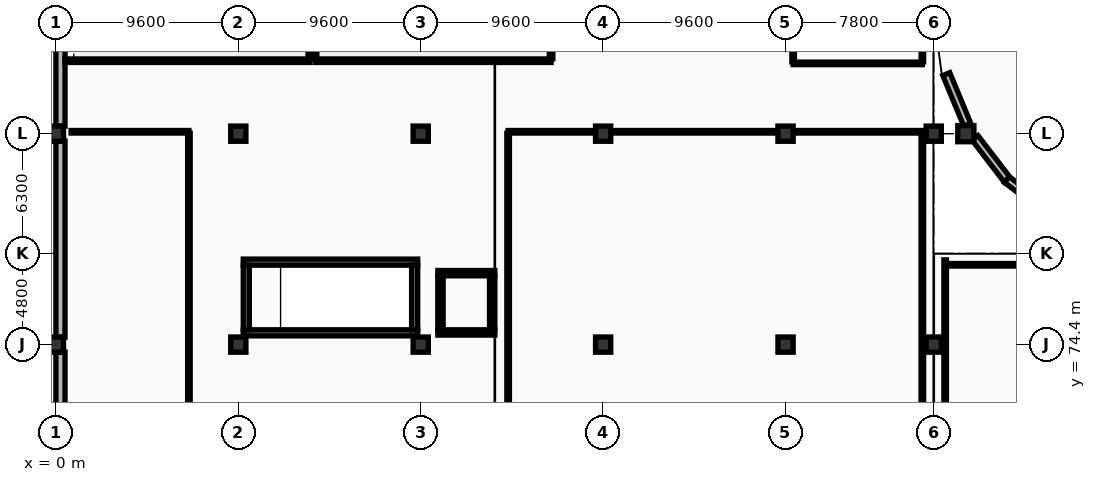
"""IFC4 building model, lengths in metres.
Left out: names, types, materials, properties, quantities, classifications, styles, units other than length and angle.
Written with IfcOpenShell. Run it as: python <this file> out.ifc"""

import sys

from ifc_helpers import new_model, si_unit, direction, frame, frame_2d, origin, origin_2d, place, context, subcontext, project, spatial, rectangle, circle, extrude, element, fill, save


model = new_model("IFC4")
c1 = context("Model", 3, precision=1e-05, world=origin(), true_north=direction((0.0, 1.0)))
c2 = subcontext(c1, "Body", "Model", "MODEL_VIEW")
j1 = project(units=[si_unit("LENGTHUNIT", "METRE"), si_unit("PLANEANGLEUNIT", "RADIAN")], contexts=[c1])
p1 = place(None, origin())
s1 = spatial("IfcSite", under=j1, at=p1, CompositionType="ELEMENT")
p2 = place(p1, origin())
s2 = spatial("IfcBuilding", under=s1, at=p2, CompositionType="ELEMENT")
p3 = place(p2, origin())
s3 = spatial("IfcBuildingStorey", under=s2, at=p3, CompositionType="ELEMENT", Elevation=0.0)
p4 = place(p3, frame((47.888, 85.5, 0.0), z_axis=(0.0, 0.0, 1.0), x_axis=(1.0, 0.0, 0.0)))
e1 = element("IfcColumn", 1, at=p4, inside=s3, PredefinedType="COLUMN", context=c2, shape_type="SweptSolid", body=[
    extrude(circle(Radius=0.425, at=origin_2d()), origin(), (0.0, 0.0, 1.0), 5.4),
])
for number, where, z_axis, x_axis in (
    (2, (0.0, 74.4, 0.0), (0.0, 0.0, 1.0), (1.0, 0.0, 0.0)),
    (3, (0.0, 85.5, 0.0), (0.0, 0.0, 1.0), (1.0, 0.0, 0.0)),
    (4, (9.6, 74.4, 0.0), (0.0, 0.0, 1.0), (1.0, 0.0, 0.0)),
    (5, (9.6, 85.5, 0.0), (0.0, 0.0, 1.0), (1.0, 0.0, 0.0)),
    (6, (19.2, 74.4, 0.0), (0.0, 0.0, 1.0), (1.0, 0.0, 0.0)),
    (7, (19.2, 85.5, 0.0), (0.0, 0.0, 1.0), (1.0, 0.0, 0.0)),
    (8, (28.8, 74.4, 0.0), (0.0, 0.0, 1.0), (1.0, 0.0, 0.0)),
    (9, (28.8, 85.5, 0.0), (0.0, 0.0, 1.0), (1.0, 0.0, 0.0)),
    (10, (38.4, 74.4, 0.0), (0.0, 0.0, 1.0), (1.0, 0.0, 0.0)),
    (11, (38.4, 85.5, 0.0), (0.0, 0.0, 1.0), (1.0, 0.0, 0.0)),
    (12, (46.2, 74.4, 0.0), (0.0, 0.0, 1.0), (1.0, 0.0, 0.0)),
    (13, (46.2, 85.5, 0.0), (0.0, 0.0, 1.0), (1.0, 0.0, 0.0)),
):
    element("IfcColumn", number, at=place(p3, frame(where, z_axis=z_axis, x_axis=x_axis)), inside=s3, PredefinedType="COLUMN", context=c2, shape_type="SweptSolid", body=[
        extrude(rectangle(XDim=0.8, YDim=0.8, at=origin_2d()), origin(), (0.0, 0.0, 1.0), 5.4),
    ])
p5 = place(p3, frame((46.86, 88.635, 0.0), z_axis=(0.0, 0.0, 1.0), x_axis=(0.382642547526, -0.923896466506, 0.0)))
e14 = element("IfcWall", 14, at=p5, inside=s3, PredefinedType="ELEMENTEDWALL", context=c2, shape_type="SweptSolid", body=[
    extrude(rectangle(XDim=2.892, YDim=0.395, at=frame_2d((1.446, 0.0))), origin(), (0.0, 0.0, 1.0), 4.27),
])
p6 = place(p5, frame((0.962, 0.0, 0.85)))
e15 = element("IfcOpeningElement", 15, at=p6, cuts=e14, PredefinedType="OPENING", context=c2, shape_type="SweptSolid", body=[
    extrude(rectangle(XDim=0.9, YDim=1.85, at=frame_2d((0.45, 0.925))), frame((0.0, 0.208, 0.0), z_axis=(0.0, -1.0, 0.0), x_axis=(1.0, 0.0, 0.0)), (0.0, 0.0, 1.0), 0.415),
])
p7 = place(p3, frame((48.369, 85.283, 0.0), z_axis=(0.0, 0.0, 1.0), x_axis=(0.608787157184, -0.793333597705, 0.0)))
e16 = element("IfcWall", 16, at=p7, inside=s3, PredefinedType="ELEMENTEDWALL", context=c2, shape_type="SweptSolid", body=[
    extrude(rectangle(XDim=2.824, YDim=0.395, at=frame_2d((1.412, 0.0))), origin(), (0.0, 0.0, 1.0), 4.27),
])
p8 = place(p7, frame((0.962, 0.0, 0.85)))
e17 = element("IfcOpeningElement", 17, at=p8, cuts=e16, PredefinedType="OPENING", context=c2, shape_type="SweptSolid", body=[
    extrude(rectangle(XDim=0.9, YDim=1.85, at=frame_2d((0.45, 0.925))), frame((0.0, 0.208, 0.0), z_axis=(0.0, -1.0, 0.0), x_axis=(1.0, 0.0, 0.0)), (0.0, 0.0, 1.0), 0.415),
])
p9 = place(p3, frame((50.043, 83.089, 0.0), z_axis=(0.0, 0.0, 1.0), x_axis=(0.793301558375, -0.608828906574, 0.0)))
e18 = element("IfcWall", 18, at=p9, inside=s3, PredefinedType="ELEMENTEDWALL", context=c2, shape_type="SweptSolid", body=[
    extrude(rectangle(XDim=2.824, YDim=0.395, at=frame_2d((1.412, 0.0))), origin(), (0.0, 0.0, 1.0), 4.17),
])
p10 = place(p9, frame((0.962, 0.0, 0.85)))
e19 = element("IfcOpeningElement", 19, at=p10, cuts=e18, PredefinedType="OPENING", context=c2, shape_type="SweptSolid", body=[
    extrude(rectangle(XDim=0.9, YDim=1.85, at=frame_2d((0.45, 0.925))), frame((0.0, 0.208, 0.0), z_axis=(0.0, -1.0, 0.0), x_axis=(1.0, 0.0, 0.0)), (0.0, 0.0, 1.0), 0.415),
])
p11 = place(p3, frame((0.24, 67.592, 0.0), z_axis=(0.0, 0.0, 1.0), x_axis=(0.0, 1.0, 0.0)))
e20 = element("IfcWall", 20, at=p11, inside=s3, PredefinedType="STANDARD", context=c2, shape_type="SweptSolid", body=[
    extrude(rectangle(XDim=6.416, YDim=0.48, at=frame_2d((3.208, 0.0))), origin(), (0.0, 0.0, 1.0), 4.28),
])
p12 = place(p11, frame((1.253, 0.0, 0.85)))
e21 = element("IfcOpeningElement", 21, at=p12, cuts=e20, PredefinedType="OPENING", context=c2, shape_type="SweptSolid", body=[
    extrude(rectangle(XDim=1.7, YDim=2.3, at=frame_2d((0.85, 1.15))), frame((0.0, 0.25, 0.0), z_axis=(0.0, -1.0, 0.0), x_axis=(1.0, 0.0, 0.0)), (0.0, 0.0, 1.0), 0.5),
])
p13 = place(p11, frame((3.703, 0.0, 0.85)))
e22 = element("IfcOpeningElement", 22, at=p13, cuts=e20, PredefinedType="OPENING", context=c2, shape_type="SweptSolid", body=[
    extrude(rectangle(XDim=1.7, YDim=2.3, at=frame_2d((0.85, 1.15))), frame((0.0, 0.25, 0.0), z_axis=(0.0, -1.0, 0.0), x_axis=(1.0, 0.0, 0.0)), (0.0, 0.0, 1.0), 0.5),
])
p14 = place(p3, frame((0.24, 74.792, 0.0), z_axis=(0.0, 0.0, 1.0), x_axis=(0.0, 1.0, 0.0)))
e23 = element("IfcWall", 23, at=p14, inside=s3, PredefinedType="STANDARD", context=c2, shape_type="SweptSolid", body=[
    extrude(rectangle(XDim=10.316, YDim=0.48, at=frame_2d((5.158, 0.0))), origin(), (0.0, 0.0, 1.0), 4.23),
])
p15 = place(p14, frame((1.295, 0.0, 0.85)))
e24 = element("IfcOpeningElement", 24, at=p15, cuts=e23, PredefinedType="OPENING", context=c2, shape_type="SweptSolid", body=[
    extrude(rectangle(XDim=1.7, YDim=2.3, at=frame_2d((0.85, 1.15))), frame((0.0, 0.25, 0.0), z_axis=(0.0, -1.0, 0.0), x_axis=(1.0, 0.0, 0.0)), (0.0, 0.0, 1.0), 0.5),
])
p16 = place(p14, frame((4.308, 0.0, 0.85)))
e25 = element("IfcOpeningElement", 25, at=p16, cuts=e23, PredefinedType="OPENING", context=c2, shape_type="SweptSolid", body=[
    extrude(rectangle(XDim=1.7, YDim=2.3, at=frame_2d((0.85, 1.15))), frame((0.0, 0.25, 0.0), z_axis=(0.0, -1.0, 0.0), x_axis=(1.0, 0.0, 0.0)), (0.0, 0.0, 1.0), 0.5),
])
p17 = place(p14, frame((7.321, 0.0, 0.85)))
e26 = element("IfcOpeningElement", 26, at=p17, cuts=e23, PredefinedType="OPENING", context=c2, shape_type="SweptSolid", body=[
    extrude(rectangle(XDim=1.7, YDim=2.3, at=frame_2d((0.85, 1.15))), frame((0.0, 0.25, 0.0), z_axis=(0.0, -1.0, 0.0), x_axis=(1.0, 0.0, 0.0)), (0.0, 0.0, 1.0), 0.5),
])
p18 = place(p3, frame((0.24, 85.892, 0.0), z_axis=(0.0, 0.0, 1.0), x_axis=(0.0, 1.0, 0.0)))
e27 = element("IfcWall", 27, at=p18, inside=s3, PredefinedType="STANDARD", context=c2, shape_type="SweptSolid", body=[
    extrude(rectangle(XDim=11.816, YDim=0.48, at=frame_2d((5.908, 0.0))), origin(), (0.0, 0.0, 1.0), 4.18),
])
p19 = place(p18, frame((0.988, 0.0, 0.0)))
e28 = element("IfcOpeningElement", 28, at=p19, cuts=e27, PredefinedType="OPENING", context=c2, shape_type="SweptSolid", body=[
    extrude(rectangle(XDim=1.8, YDim=2.25, at=frame_2d((0.9, 1.125))), frame((0.0, 0.25, 0.0), z_axis=(0.0, -1.0, 0.0), x_axis=(1.0, 0.0, 0.0)), (0.0, 0.0, 1.0), 0.5),
])
for number, where, z_axis, x_axis in (
    (29, (9.86, 78.74, 0.0), (0.0, 0.0, 1.0), (1.0, 0.0, 0.0)),
    (30, (19.04, 75.02, 0.0), (0.0, 0.0, 1.0), (-1.0, 0.0, 0.0)),
):
    element("IfcWall", number, at=place(p3, frame(where, z_axis=z_axis, x_axis=x_axis)), inside=s3, PredefinedType="SHEAR", context=c2, shape_type="SweptSolid", body=[
        extrude(rectangle(XDim=9.18, YDim=0.32, at=frame_2d((4.59, 0.0))), origin(), (0.0, 0.0, 1.0), 5.14),
    ])
p20 = place(p3, frame((10.02, 75.18, 0.0), z_axis=(0.0, 0.0, 1.0), x_axis=(0.0, 1.0, 0.0)))
e31 = element("IfcWall", 31, at=p20, inside=s3, PredefinedType="SHEAR", context=c2, shape_type="SweptSolid", body=[
    extrude(rectangle(XDim=3.4, YDim=0.32, at=frame_2d((1.7, 0.0))), origin(), (0.0, 0.0, 1.0), 5.14),
])
p21 = place(p20, frame((1.125, 0.0, 0.0)))
e32 = element("IfcOpeningElement", 32, at=p21, cuts=e31, PredefinedType="OPENING", context=c2, shape_type="SweptSolid", body=[
    extrude(rectangle(XDim=1.15, YDim=2.2, at=frame_2d((0.575, 1.1))), frame((0.0, 0.17, 0.0), z_axis=(0.0, -1.0, 0.0), x_axis=(1.0, 0.0, 0.0)), (0.0, 0.0, 1.0), 0.34),
])
p22 = place(p3, frame((18.88, 78.58, 0.0), z_axis=(0.0, 0.0, 1.0), x_axis=(0.0, -1.0, 0.0)))
e33 = element("IfcWall", 33, at=p22, inside=s3, PredefinedType="SHEAR", context=c2, shape_type="SweptSolid", body=[
    extrude(rectangle(XDim=3.4, YDim=0.32, at=frame_2d((1.7, 0.0))), origin(), (0.0, 0.0, 1.0), 5.14),
])
p23 = place(p3, frame((20.1, 78.16, 0.0), z_axis=(0.0, 0.0, 1.0), x_axis=(1.0, 0.0, 0.0)))
e34 = element("IfcWall", 34, at=p23, inside=s3, PredefinedType="SHEAR", context=c2, shape_type="SweptSolid", body=[
    extrude(rectangle(XDim=3.0, YDim=0.28, at=frame_2d((1.5, 0.0))), origin(), (0.0, 0.0, 1.0), 5.14),
])
p24 = place(p23, frame((0.975, 0.0, 0.0)))
e35 = element("IfcOpeningElement", 35, at=p24, cuts=e34, PredefinedType="OPENING", context=c2, shape_type="SweptSolid", body=[
    extrude(rectangle(XDim=1.05, YDim=2.2, at=frame_2d((0.525, 1.1))), frame((0.0, 0.15, 0.0), z_axis=(0.0, -1.0, 0.0), x_axis=(1.0, 0.0, 0.0)), (0.0, 0.0, 1.0), 0.3),
])
p25 = place(p3, frame((23.1, 75.04, 0.0), z_axis=(0.0, 0.0, 1.0), x_axis=(-1.0, 0.0, 0.0)))
e36 = element("IfcWall", 36, at=p25, inside=s3, PredefinedType="SHEAR", context=c2, shape_type="SweptSolid", body=[
    extrude(rectangle(XDim=3.0, YDim=0.28, at=frame_2d((1.5, 0.0))), origin(), (0.0, 0.0, 1.0), 5.14),
])
for number, where, z_axis, x_axis in (
    (37, (20.24, 75.18, 0.0), (0.0, 0.0, 1.0), (0.0, 1.0, 0.0)),
    (38, (22.96, 78.02, 0.0), (0.0, 0.0, 1.0), (0.0, -1.0, 0.0)),
):
    element("IfcWall", number, at=place(p3, frame(where, z_axis=z_axis, x_axis=x_axis)), inside=s3, PredefinedType="SHEAR", context=c2, shape_type="SweptSolid", body=[
        extrude(rectangle(XDim=2.84, YDim=0.28, at=frame_2d((1.42, 0.0))), origin(), (0.0, 0.0, 1.0), 5.14),
    ])
p26 = place(p3, frame((13.36, 89.34, 0.0), z_axis=(0.0, 0.0, 1.0), x_axis=(-1.0, 0.0, 0.0)))
e39 = element("IfcWall", 39, at=p26, inside=s3, PredefinedType="PARTITIONING", context=c2, shape_type="SweptSolid", body=[
    extrude(rectangle(XDim=12.886, YDim=0.185, at=frame_2d((6.443, 0.0))), origin(), (0.0, 0.0, 1.0), 4.23),
])
p27 = place(p26, frame((1.878, 0.0, 0.0)))
e40 = element("IfcOpeningElement", 40, at=p27, cuts=e39, PredefinedType="OPENING", context=c2, shape_type="SweptSolid", body=[
    extrude(rectangle(XDim=2.0, YDim=2.5, at=frame_2d((1.0, 1.25))), frame((0.0, 0.103, 0.0), z_axis=(0.0, -1.0, 0.0), x_axis=(1.0, 0.0, 0.0)), (0.0, 0.0, 1.0), 0.205),
])
p28 = place(p3, frame((13.36, 112.326, 0.0), z_axis=(0.0, 0.0, 1.0), x_axis=(0.0, -1.0, 0.0)))
e41 = element("IfcWall", 41, at=p28, inside=s3, PredefinedType="PARTITIONING", context=c2, shape_type="SweptSolid", body=[
    extrude(rectangle(XDim=22.884, YDim=0.185, at=frame_2d((11.442, 0.0))), origin(), (0.0, 0.0, 1.0), 4.33),
])
p29 = place(p3, frame((26.06, 89.34, 0.0), z_axis=(0.0, 0.0, 1.0), x_axis=(-1.0, 0.0, 0.0)))
e42 = element("IfcWall", 42, at=p29, inside=s3, PredefinedType="PARTITIONING", context=c2, shape_type="SweptSolid", body=[
    extrude(rectangle(XDim=12.42, YDim=0.185, at=frame_2d((6.21, 0.0))), origin(), (0.0, 0.0, 1.0), 4.23),
])
p30 = place(p29, frame((1.808, 0.0, 0.0)))
e43 = element("IfcOpeningElement", 43, at=p30, cuts=e42, PredefinedType="OPENING", context=c2, shape_type="SweptSolid", body=[
    extrude(rectangle(XDim=2.0, YDim=2.5, at=frame_2d((1.0, 1.25))), frame((0.0, 0.103, 0.0), z_axis=(0.0, -1.0, 0.0), x_axis=(1.0, 0.0, 0.0)), (0.0, 0.0, 1.0), 0.205),
])
for number, where, z_axis, x_axis in (
    (44, (13.64, 89.442, 0.0), (0.0, 0.0, 1.0), (0.0, 1.0, 0.0)),
    (45, (26.06, 97.597, 0.0), (0.0, 0.0, 1.0), (0.0, -1.0, 0.0)),
):
    element("IfcWall", number, at=place(p3, frame(where, z_axis=z_axis, x_axis=x_axis)), inside=s3, PredefinedType="PARTITIONING", context=c2, shape_type="SweptSolid", body=[
        extrude(rectangle(XDim=8.155, YDim=0.185, at=frame_2d((4.078, 0.0))), origin(), (0.0, 0.0, 1.0), 4.48),
    ])
p31 = place(p3, frame((45.6, 89.2, 0.0), z_axis=(0.0, 0.0, 1.0), x_axis=(-1.0, 0.0, 0.0)))
e46 = element("IfcWall", 46, at=p31, inside=s3, PredefinedType="PARTITIONING", context=c2, shape_type="SweptSolid", body=[
    extrude(rectangle(XDim=6.8, YDim=0.135, at=frame_2d((3.4, 0.0))), origin(), (0.0, 0.0, 1.0), 4.23),
])
p32 = place(p31, frame((2.153, 0.0, 0.0)))
e47 = element("IfcOpeningElement", 47, at=p32, cuts=e46, PredefinedType="OPENING", context=c2, shape_type="SweptSolid", body=[
    extrude(rectangle(XDim=0.95, YDim=2.15, at=frame_2d((0.475, 1.075))), frame((0.0, 0.077, 0.0), z_axis=(0.0, -1.0, 0.0), x_axis=(1.0, 0.0, 0.0)), (0.0, 0.0, 1.0), 0.155),
])
p33 = place(p3, frame((38.8, 89.278, 0.0), z_axis=(0.0, 0.0, 1.0), x_axis=(0.0, 1.0, 0.0)))
e48 = element("IfcWall", 48, at=p33, inside=s3, PredefinedType="PARTITIONING", context=c2, shape_type="SweptSolid", body=[
    extrude(rectangle(XDim=12.645, YDim=0.135, at=frame_2d((6.323, 0.0))), origin(), (0.0, 0.0, 1.0), 4.18),
])
p34 = place(p3, frame((45.6, 101.923, 0.0), z_axis=(0.0, 0.0, 1.0), x_axis=(0.0, -1.0, 0.0)))
e49 = element("IfcWall", 49, at=p34, inside=s3, PredefinedType="PARTITIONING", context=c2, shape_type="SweptSolid", body=[
    extrude(rectangle(XDim=12.645, YDim=0.135, at=frame_2d((6.323, 0.0))), origin(), (0.0, 0.0, 1.0), 4.47),
])
p35 = place(p3, frame((0.8, 85.6, 0.0), z_axis=(0.0, 0.0, 1.0), x_axis=(1.0, 0.0, 0.0)))
e50 = element("IfcWall", 50, at=p35, inside=s3, PredefinedType="PARTITIONING", context=c2, shape_type="SweptSolid", body=[
    extrude(rectangle(XDim=6.2, YDim=0.135, at=frame_2d((3.1, 0.0))), origin(), (0.0, 0.0, 1.0), 4.33),
])
p36 = place(p35, frame((2.17, 0.0, 0.0)))
e51 = element("IfcOpeningElement", 51, at=p36, cuts=e50, PredefinedType="OPENING", context=c2, shape_type="SweptSolid", body=[
    extrude(rectangle(XDim=0.95, YDim=2.15, at=frame_2d((0.475, 1.075))), frame((0.0, 0.077, 0.0), z_axis=(0.0, -1.0, 0.0), x_axis=(1.0, 0.0, 0.0)), (0.0, 0.0, 1.0), 0.155),
])
p37 = place(p3, frame((7.0, 85.522, 0.0), z_axis=(0.0, 0.0, 1.0), x_axis=(0.0, -1.0, 0.0)))
e52 = element("IfcWall", 52, at=p37, inside=s3, PredefinedType="PARTITIONING", context=c2, shape_type="SweptSolid", body=[
    extrude(rectangle(XDim=17.645, YDim=0.135, at=frame_2d((8.823, 0.0))), origin(), (0.0, 0.0, 1.0), 4.33),
])
p38 = place(p3, frame((23.8, 85.6, 0.0), z_axis=(0.0, 0.0, 1.0), x_axis=(1.0, 0.0, 0.0)))
e53 = element("IfcWall", 53, at=p38, inside=s3, PredefinedType="PARTITIONING", context=c2, shape_type="SweptSolid", body=[
    extrude(rectangle(XDim=21.8, YDim=0.135, at=frame_2d((10.9, 0.0))), origin(), (0.0, 0.0, 1.0), 4.23),
])
p39 = place(p38, frame((8.41, 0.0, 0.0)))
e54 = element("IfcOpeningElement", 54, at=p39, cuts=e53, PredefinedType="OPENING", context=c2, shape_type="SweptSolid", body=[
    extrude(rectangle(XDim=0.95, YDim=2.15, at=frame_2d((0.475, 1.075))), frame((0.0, 0.077, 0.0), z_axis=(0.0, -1.0, 0.0), x_axis=(1.0, 0.0, 0.0)), (0.0, 0.0, 1.0), 0.155),
])
p40 = place(p3, frame((23.8, 67.877, 0.0), z_axis=(0.0, 0.0, 1.0), x_axis=(0.0, 1.0, 0.0)))
e55 = element("IfcWall", 55, at=p40, inside=s3, PredefinedType="PARTITIONING", context=c2, shape_type="SweptSolid", body=[
    extrude(rectangle(XDim=17.645, YDim=0.135, at=frame_2d((8.823, 0.0))), origin(), (0.0, 0.0, 1.0), 4.33),
])
p41 = place(p3, frame((45.6, 85.522, 0.0), z_axis=(0.0, 0.0, 1.0), x_axis=(0.0, -1.0, 0.0)))
e56 = element("IfcWall", 56, at=p41, inside=s3, PredefinedType="PARTITIONING", context=c2, shape_type="SweptSolid", body=[
    extrude(rectangle(XDim=18.348, YDim=0.135, at=frame_2d((9.174, 0.0))), origin(), (0.0, 0.0, 1.0), 4.47),
])
p42 = place(p3, frame((46.8, 78.6, 0.0), z_axis=(0.0, 0.0, 1.0), x_axis=(1.0, 0.0, 0.0)))
e57 = element("IfcWall", 57, at=p42, inside=s3, PredefinedType="PARTITIONING", context=c2, shape_type="SweptSolid", body=[
    extrude(rectangle(XDim=9.6, YDim=0.135, at=frame_2d((4.8, 0.0))), origin(), (0.0, 0.0, 1.0), 5.125),
])
p43 = place(p3, frame((46.8, 70.877, 0.0), z_axis=(0.0, 0.0, 1.0), x_axis=(0.0, 1.0, 0.0)))
e58 = element("IfcWall", 58, at=p43, inside=s3, PredefinedType="PARTITIONING", context=c2, shape_type="SweptSolid", body=[
    extrude(rectangle(XDim=7.983, YDim=0.135, at=frame_2d((3.991, 0.0))), origin(), (0.0, 0.0, 1.0), 4.23),
])
p44 = place(p6, origin())
e59 = element("IfcWindow", 59, at=p44, inside=s3, PartitioningType="SINGLE_PANEL", PredefinedType="WINDOW", context=c2, shape_type="SweptSolid", body=[
    extrude(rectangle(XDim=0.9, YDim=1.85, at=frame_2d((0.45, 0.925))), frame((0.0, 0.03, 0.0), z_axis=(0.0, -1.0, 0.0), x_axis=(1.0, 0.0, 0.0)), (0.0, 0.0, 1.0), 0.06),
])
fill(e15, e59)
p45 = place(p8, origin())
e60 = element("IfcWindow", 60, at=p45, inside=s3, PartitioningType="SINGLE_PANEL", PredefinedType="WINDOW", context=c2, shape_type="SweptSolid", body=[
    extrude(rectangle(XDim=0.9, YDim=1.85, at=frame_2d((0.45, 0.925))), frame((0.0, 0.03, 0.0), z_axis=(0.0, -1.0, 0.0), x_axis=(1.0, 0.0, 0.0)), (0.0, 0.0, 1.0), 0.06),
])
fill(e17, e60)
p46 = place(p13, origin())
e61 = element("IfcWindow", 61, at=p46, inside=s3, PartitioningType="SINGLE_PANEL", PredefinedType="WINDOW", context=c2, shape_type="SweptSolid", body=[
    extrude(rectangle(XDim=1.7, YDim=2.3, at=frame_2d((0.85, 1.15))), frame((0.0, 0.03, 0.0), z_axis=(0.0, -1.0, 0.0), x_axis=(1.0, 0.0, 0.0)), (0.0, 0.0, 1.0), 0.06),
])
fill(e22, e61)
p47 = place(p15, origin())
e62 = element("IfcWindow", 62, at=p47, inside=s3, PartitioningType="SINGLE_PANEL", PredefinedType="WINDOW", context=c2, shape_type="SweptSolid", body=[
    extrude(rectangle(XDim=1.7, YDim=2.3, at=frame_2d((0.85, 1.15))), frame((0.0, 0.03, 0.0), z_axis=(0.0, -1.0, 0.0), x_axis=(1.0, 0.0, 0.0)), (0.0, 0.0, 1.0), 0.06),
])
fill(e24, e62)
p48 = place(p16, origin())
e63 = element("IfcWindow", 63, at=p48, inside=s3, PartitioningType="SINGLE_PANEL", PredefinedType="WINDOW", context=c2, shape_type="SweptSolid", body=[
    extrude(rectangle(XDim=1.7, YDim=2.3, at=frame_2d((0.85, 1.15))), frame((0.0, 0.03, 0.0), z_axis=(0.0, -1.0, 0.0), x_axis=(1.0, 0.0, 0.0)), (0.0, 0.0, 1.0), 0.06),
])
fill(e25, e63)
p49 = place(p17, origin())
e64 = element("IfcWindow", 64, at=p49, inside=s3, PartitioningType="SINGLE_PANEL", PredefinedType="WINDOW", context=c2, shape_type="SweptSolid", body=[
    extrude(rectangle(XDim=1.7, YDim=2.3, at=frame_2d((0.85, 1.15))), frame((0.0, 0.03, 0.0), z_axis=(0.0, -1.0, 0.0), x_axis=(1.0, 0.0, 0.0)), (0.0, 0.0, 1.0), 0.06),
])
fill(e26, e64)
p50 = place(p19, origin())
e65 = element("IfcDoor", 65, at=p50, inside=s3, OperationType="DOUBLE_DOOR_SINGLE_SWING", PredefinedType="DOOR", context=c2, shape_type="SweptSolid", body=[
    extrude(rectangle(XDim=1.8, YDim=2.25, at=frame_2d((0.9, 1.125))), frame((0.0, 0.025, 0.0), z_axis=(0.0, -1.0, 0.0), x_axis=(1.0, 0.0, 0.0)), (0.0, 0.0, 1.0), 0.05),
])
fill(e28, e65)
p51 = place(p21, origin())
e66 = element("IfcDoor", 66, at=p51, inside=s3, OperationType="SINGLE_SWING_LEFT", PredefinedType="DOOR", context=c2, shape_type="SweptSolid", body=[
    extrude(rectangle(XDim=1.15, YDim=2.2, at=frame_2d((0.575, 1.1))), frame((0.0, 0.025, 0.0), z_axis=(0.0, -1.0, 0.0), x_axis=(1.0, 0.0, 0.0)), (0.0, 0.0, 1.0), 0.05),
])
fill(e32, e66)
p52 = place(p24, origin())
e67 = element("IfcDoor", 67, at=p52, inside=s3, OperationType="DOUBLE_DOOR_SLIDING", PredefinedType="DOOR", context=c2, shape_type="SweptSolid", body=[
    extrude(rectangle(XDim=1.05, YDim=2.2, at=frame_2d((0.525, 1.1))), frame((0.0, 0.025, 0.0), z_axis=(0.0, -1.0, 0.0), x_axis=(1.0, 0.0, 0.0)), (0.0, 0.0, 1.0), 0.05),
])
fill(e35, e67)
p53 = place(p27, origin())
e68 = element("IfcDoor", 68, at=p53, inside=s3, OperationType="DOUBLE_DOOR_SINGLE_SWING", PredefinedType="DOOR", context=c2, shape_type="SweptSolid", body=[
    extrude(rectangle(XDim=2.0, YDim=2.5, at=frame_2d((1.0, 1.25))), frame((0.0, 0.025, 0.0), z_axis=(0.0, -1.0, 0.0), x_axis=(1.0, 0.0, 0.0)), (0.0, 0.0, 1.0), 0.05),
])
fill(e40, e68)
p54 = place(p30, origin())
e69 = element("IfcDoor", 69, at=p54, inside=s3, OperationType="DOUBLE_DOOR_SINGLE_SWING", PredefinedType="DOOR", context=c2, shape_type="SweptSolid", body=[
    extrude(rectangle(XDim=2.0, YDim=2.5, at=frame_2d((1.0, 1.25))), frame((0.0, 0.025, 0.0), z_axis=(0.0, -1.0, 0.0), x_axis=(1.0, 0.0, 0.0)), (0.0, 0.0, 1.0), 0.05),
])
fill(e43, e69)
p55 = place(p32, origin())
e70 = element("IfcDoor", 70, at=p55, inside=s3, OperationType="SINGLE_SWING_LEFT", PredefinedType="DOOR", context=c2, shape_type="SweptSolid", body=[
    extrude(rectangle(XDim=0.95, YDim=2.15, at=frame_2d((0.475, 1.075))), frame((0.0, 0.025, 0.0), z_axis=(0.0, -1.0, 0.0), x_axis=(1.0, 0.0, 0.0)), (0.0, 0.0, 1.0), 0.05),
])
fill(e47, e70)
p56 = place(p36, origin())
e71 = element("IfcDoor", 71, at=p56, inside=s3, OperationType="SINGLE_SWING_RIGHT", PredefinedType="DOOR", context=c2, shape_type="SweptSolid", body=[
    extrude(rectangle(XDim=0.95, YDim=2.15, at=frame_2d((0.475, 1.075))), frame((0.0, 0.025, 0.0), z_axis=(0.0, -1.0, 0.0), x_axis=(1.0, 0.0, 0.0)), (0.0, 0.0, 1.0), 0.05),
])
fill(e51, e71)
p57 = place(p39, origin())
e72 = element("IfcDoor", 72, at=p57, inside=s3, OperationType="SINGLE_SWING_LEFT", PredefinedType="DOOR", context=c2, shape_type="SweptSolid", body=[
    extrude(rectangle(XDim=0.95, YDim=2.15, at=frame_2d((0.475, 1.075))), frame((0.0, 0.025, 0.0), z_axis=(0.0, -1.0, 0.0), x_axis=(1.0, 0.0, 0.0)), (0.0, 0.0, 1.0), 0.05),
])
fill(e54, e72)
save(model, sys.argv[1])
